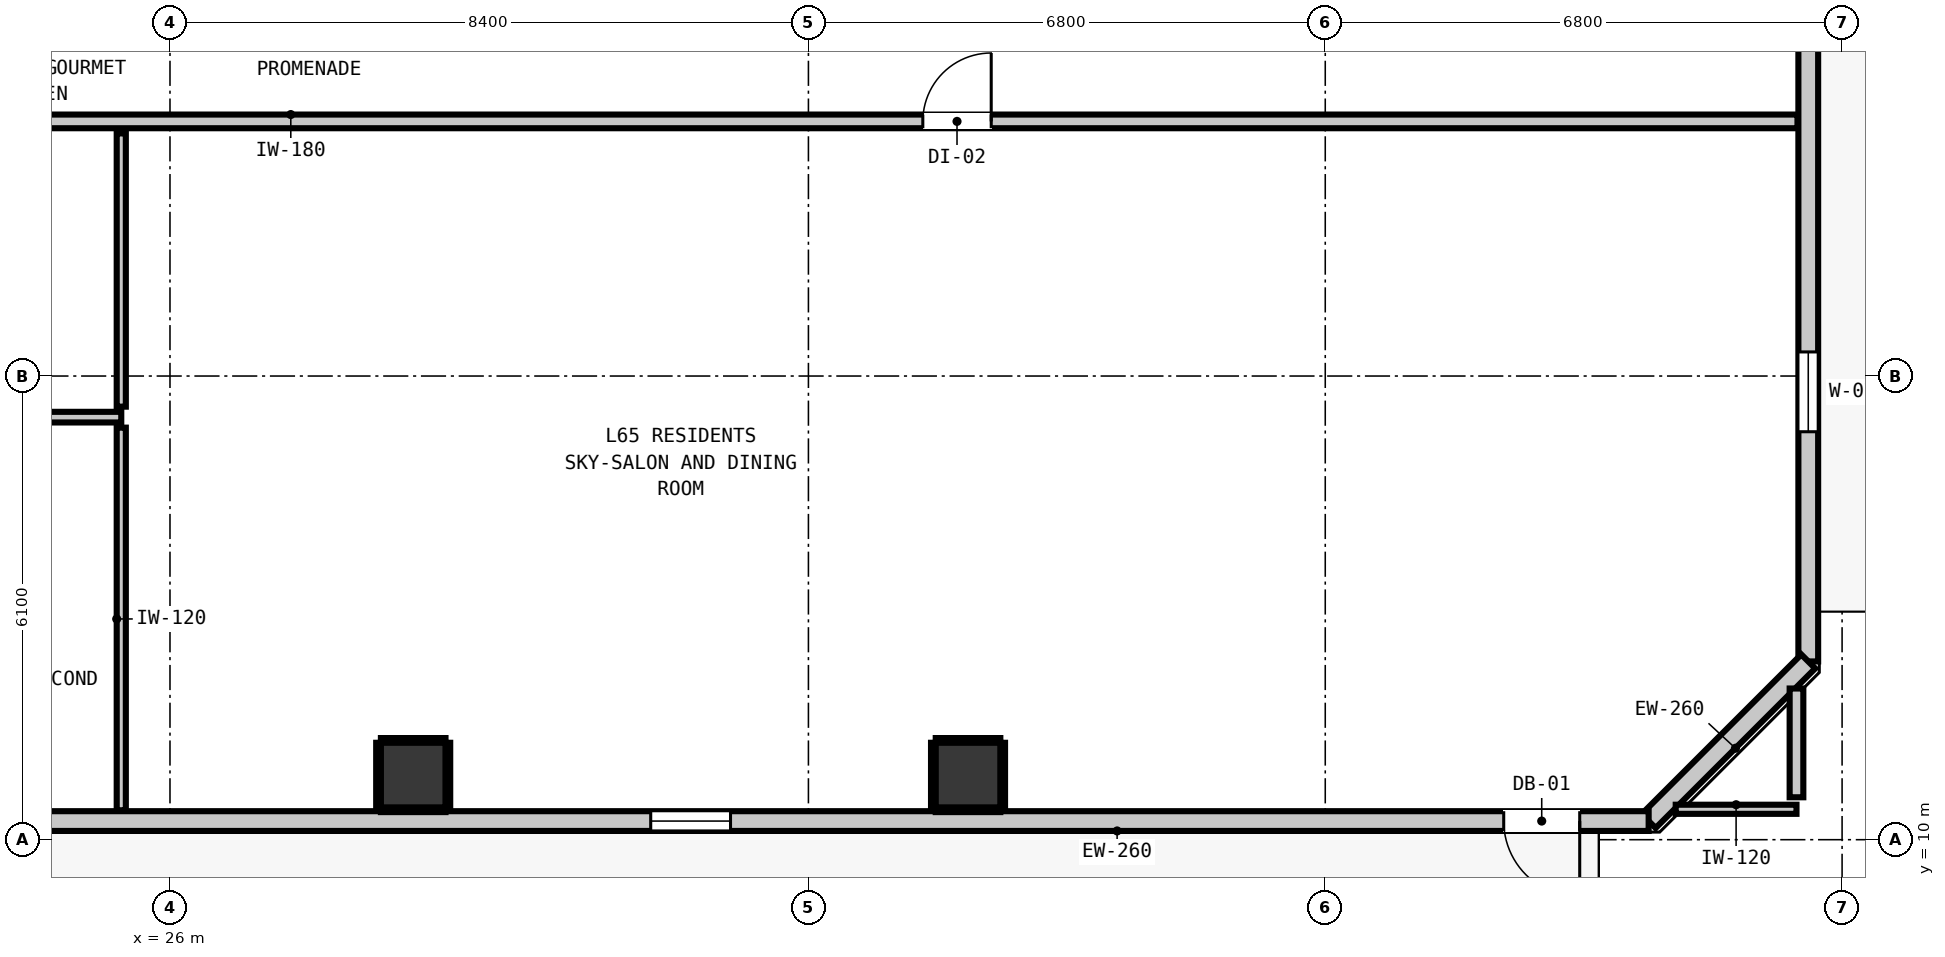
"""IFC4 building model, lengths in metres.
Left out: names, types, materials, properties, quantities, classifications, styles, units other than length and angle.
Written with IfcOpenShell. Run it as: python <this file> out.ifc"""

import sys

from ifc_helpers import new_model, si_unit, direction, frame, frame_2d, origin, origin_2d, place, context, subcontext, project, spatial, rectangle, extrude, element, fill, save


model = new_model("IFC4")
c1 = context("Model", 3, precision=1e-05, world=origin(), true_north=direction((0.0, 1.0)))
c2 = subcontext(c1, "Body", "Model", "MODEL_VIEW")
j1 = project(units=[si_unit("LENGTHUNIT", "METRE"), si_unit("PLANEANGLEUNIT", "RADIAN")], contexts=[c1])
p1 = place(None, origin())
s1 = spatial("IfcSite", under=j1, at=p1, CompositionType="ELEMENT")
p2 = place(p1, origin())
s2 = spatial("IfcBuilding", under=s1, at=p2, CompositionType="ELEMENT")
p3 = place(p2, frame((0.0, 0.0, 223.36)))
s3 = spatial("IfcBuildingStorey", under=s2, at=p3, CompositionType="ELEMENT", Elevation=223.36)
for number, where, z_axis, x_axis in (
    (1, (29.2, 10.85, 0.0), (0.0, 0.0, 1.0), (1.0, 0.0, 0.0)),
    (2, (36.5, 10.85, 0.0), (0.0, 0.0, 1.0), (1.0, 0.0, 0.0)),
):
    element("IfcColumn", number, at=place(p3, frame(where, z_axis=z_axis, x_axis=x_axis)), inside=s3, PredefinedType="COLUMN", context=c2, shape_type="SweptSolid", body=[
        extrude(rectangle(XDim=0.85, YDim=0.85, at=origin_2d()), origin(), (0.0, 0.0, 1.0), 3.32),
    ])
p4 = place(p3, frame((47.555, 42.655, 0.0), z_axis=(0.0, 0.0, 1.0), x_axis=(0.0, -1.0, 0.0)))
e3 = element("IfcWall", 3, at=p4, inside=s3, PredefinedType="STANDARD", context=c2, shape_type="SweptSolid", body=[
    extrude(rectangle(XDim=30.31, YDim=0.26, at=frame_2d((15.155, 0.0))), origin(), (0.0, 0.0, 1.0), 2.92),
])
p5 = place(p4, frame((4.082, 0.0, 0.0)))
e4 = element("IfcOpeningElement", 4, at=p5, cuts=e3, PredefinedType="OPENING", context=c2, shape_type="SweptSolid", body=[
    extrude(rectangle(XDim=1.0, YDim=2.15, at=frame_2d((0.5, 1.075))), frame((0.0, 0.14, 0.0), z_axis=(0.0, -1.0, 0.0), x_axis=(1.0, 0.0, 0.0)), (0.0, 0.0, 1.0), 0.28),
])
p6 = place(p4, frame((26.238, 0.0, 0.85)))
e5 = element("IfcOpeningElement", 5, at=p6, cuts=e3, PredefinedType="OPENING", context=c2, shape_type="SweptSolid", body=[
    extrude(rectangle(XDim=1.05, YDim=1.65, at=frame_2d((0.525, 0.825))), frame((0.0, 0.14, 0.0), z_axis=(0.0, -1.0, 0.0), x_axis=(1.0, 0.0, 0.0)), (0.0, 0.0, 1.0), 0.28),
])
p7 = place(p3, frame((47.555, 12.345, 0.0), z_axis=(0.0, 0.0, 1.0), x_axis=(-0.707106781187, -0.707106781187, 0.0)))
e6 = element("IfcWall", 6, at=p7, inside=s3, PredefinedType="STANDARD", context=c2, shape_type="SweptSolid", body=[
    extrude(rectangle(XDim=2.97, YDim=0.26, at=frame_2d((1.485, 0.0))), origin(), (0.0, 0.0, 1.0), 2.92),
])
p8 = place(p3, frame((45.455, 10.245, 0.0), z_axis=(0.0, 0.0, 1.0), x_axis=(-1.0, 0.0, 0.0)))
e7 = element("IfcWall", 7, at=p8, inside=s3, PredefinedType="STANDARD", context=c2, shape_type="SweptSolid", body=[
    extrude(rectangle(XDim=32.71, YDim=0.26, at=frame_2d((16.355, 0.0))), origin(), (0.0, 0.0, 1.0), 2.92),
])
p9 = place(p8, frame((0.907, 0.0, 0.0)))
e8 = element("IfcOpeningElement", 8, at=p9, cuts=e7, PredefinedType="OPENING", context=c2, shape_type="SweptSolid", body=[
    extrude(rectangle(XDim=1.0, YDim=2.15, at=frame_2d((0.5, 1.075))), frame((0.0, 0.14, 0.0), z_axis=(0.0, -1.0, 0.0), x_axis=(1.0, 0.0, 0.0)), (0.0, 0.0, 1.0), 0.28),
])
p10 = place(p8, frame((27.108, 0.0, 0.85)))
e9 = element("IfcOpeningElement", 9, at=p10, cuts=e7, PredefinedType="OPENING", context=c2, shape_type="SweptSolid", body=[
    extrude(rectangle(XDim=1.05, YDim=1.65, at=frame_2d((0.525, 0.825))), frame((0.0, 0.14, 0.0), z_axis=(0.0, -1.0, 0.0), x_axis=(1.0, 0.0, 0.0)), (0.0, 0.0, 1.0), 0.28),
])
p11 = place(p8, frame((30.558, 0.0, 0.85)))
e10 = element("IfcOpeningElement", 10, at=p11, cuts=e7, PredefinedType="OPENING", context=c2, shape_type="SweptSolid", body=[
    extrude(rectangle(XDim=0.9, YDim=1.5, at=frame_2d((0.45, 0.75))), frame((0.0, 0.14, 0.0), z_axis=(0.0, -1.0, 0.0), x_axis=(1.0, 0.0, 0.0)), (0.0, 0.0, 1.0), 0.28),
])
p12 = place(p8, frame((21.06, 0.0, 0.85)))
e11 = element("IfcOpeningElement", 11, at=p12, cuts=e7, PredefinedType="OPENING", context=c2, shape_type="SweptSolid", body=[
    extrude(rectangle(XDim=1.05, YDim=1.65, at=frame_2d((0.525, 0.825))), frame((0.0, 0.14, 0.0), z_axis=(0.0, -1.0, 0.0), x_axis=(1.0, 0.0, 0.0)), (0.0, 0.0, 1.0), 0.28),
])
p13 = place(p8, frame((12.08, 0.0, 0.85)))
e12 = element("IfcOpeningElement", 12, at=p13, cuts=e7, PredefinedType="OPENING", context=c2, shape_type="SweptSolid", body=[
    extrude(rectangle(XDim=1.05, YDim=1.65, at=frame_2d((0.525, 0.825))), frame((0.0, 0.14, 0.0), z_axis=(0.0, -1.0, 0.0), x_axis=(1.0, 0.0, 0.0)), (0.0, 0.0, 1.0), 0.28),
])
p14 = place(p3, frame((10.787, 19.45, 0.0), z_axis=(0.0, 0.0, 1.0), x_axis=(1.0, 0.0, 0.0)))
e13 = element("IfcWall", 13, at=p14, inside=s3, PredefinedType="PARTITIONING", context=c2, shape_type="SweptSolid", body=[
    extrude(rectangle(XDim=36.626, YDim=0.18, at=frame_2d((18.313, 0.0))), origin(), (0.0, 0.0, 1.0), 2.92),
])
p15 = place(p14, frame((7.487, 0.0, 0.0)))
e14 = element("IfcOpeningElement", 14, at=p15, cuts=e13, PredefinedType="OPENING", context=c2, shape_type="SweptSolid", body=[
    extrude(rectangle(XDim=1.0, YDim=2.15, at=frame_2d((0.5, 1.075))), frame((0.0, 0.1, 0.0), z_axis=(0.0, -1.0, 0.0), x_axis=(1.0, 0.0, 0.0)), (0.0, 0.0, 1.0), 0.2),
])
p16 = place(p14, frame((25.118, 0.0, 0.0)))
e15 = element("IfcOpeningElement", 15, at=p16, cuts=e13, PredefinedType="OPENING", context=c2, shape_type="SweptSolid", body=[
    extrude(rectangle(XDim=0.9, YDim=2.1, at=frame_2d((0.45, 1.05))), frame((0.0, 0.1, 0.0), z_axis=(0.0, -1.0, 0.0), x_axis=(1.0, 0.0, 0.0)), (0.0, 0.0, 1.0), 0.2),
])
p17 = place(p3, frame((22.38, 15.559, 0.0), z_axis=(0.0, 0.0, 1.0), x_axis=(1.0, 0.0, 0.0)))
e16 = element("IfcWall", 16, at=p17, inside=s3, PredefinedType="PARTITIONING", context=c2, shape_type="SweptSolid", body=[
    extrude(rectangle(XDim=2.979, YDim=0.14, at=frame_2d((1.49, 0.0))), origin(), (0.0, 0.0, 1.0), 2.92),
])
p18 = place(p3, frame((45.811, 10.4, 0.0), z_axis=(0.0, 0.0, 1.0), x_axis=(1.0, 0.0, 0.0)))
e17 = element("IfcWall", 17, at=p18, inside=s3, PredefinedType="PARTITIONING", context=c2, shape_type="SweptSolid", body=[
    extrude(rectangle(XDim=1.589, YDim=0.12, at=frame_2d((0.794, 0.0))), origin(), (0.0, 0.0, 1.0), 2.92),
])
p19 = place(p3, frame((47.4, 10.558, 0.0), z_axis=(0.0, 0.0, 1.0), x_axis=(0.0, 1.0, 0.0)))
e18 = element("IfcWall", 18, at=p19, inside=s3, PredefinedType="PARTITIONING", context=c2, shape_type="SweptSolid", body=[
    extrude(rectangle(XDim=1.431, YDim=0.18, at=frame_2d((0.715, 0.0))), origin(), (0.0, 0.0, 1.0), 2.92),
])
p20 = place(p3, frame((25.359, 10.387, 0.0), z_axis=(0.0, 0.0, 1.0), x_axis=(0.0, 1.0, 0.0)))
e19 = element("IfcWall", 19, at=p20, inside=s3, PredefinedType="PARTITIONING", context=c2, shape_type="SweptSolid", body=[
    extrude(rectangle(XDim=5.034, YDim=0.12, at=frame_2d((2.517, 0.0))), origin(), (0.0, 0.0, 1.0), 2.92),
])
p21 = place(p3, frame((25.359, 15.697, 0.0), z_axis=(0.0, 0.0, 1.0), x_axis=(0.0, 1.0, 0.0)))
e20 = element("IfcWall", 20, at=p21, inside=s3, PredefinedType="PARTITIONING", context=c2, shape_type="SweptSolid", body=[
    extrude(rectangle(XDim=3.595, YDim=0.12, at=frame_2d((1.797, 0.0))), origin(), (0.0, 0.0, 1.0), 2.92),
])
for number, where, z_axis, x_axis in (
    (21, (28.775, 10.393, 0.0), (0.0, 0.0, 1.0), (1.0, 0.0, 0.0)),
    (22, (28.775, 11.307, 0.0), (0.0, 0.0, 1.0), (1.0, 0.0, 0.0)),
):
    element("IfcWall", number, at=place(p3, frame(where, z_axis=z_axis, x_axis=x_axis)), inside=s3, PredefinedType="PARTITIONING", context=c2, shape_type="SweptSolid", body=[
        extrude(rectangle(XDim=0.85, YDim=0.06, at=frame_2d((0.425, 0.0))), origin(), (0.0, 0.0, 1.0), 1.45),
    ])
for number, where, z_axis, x_axis in (
    (23, (28.743, 10.425, 0.0), (0.0, 0.0, 1.0), (0.0, 1.0, 0.0)),
    (24, (29.657, 10.425, 0.0), (0.0, 0.0, 1.0), (0.0, 1.0, 0.0)),
):
    element("IfcWall", number, at=place(p3, frame(where, z_axis=z_axis, x_axis=x_axis)), inside=s3, PredefinedType="PARTITIONING", context=c2, shape_type="SweptSolid", body=[
        extrude(rectangle(XDim=0.85, YDim=0.06, at=frame_2d((0.425, 0.0))), origin(), (0.0, 0.0, 1.0), 1.45),
    ])
for number, where, z_axis, x_axis in (
    (25, (36.075, 10.393, 0.0), (0.0, 0.0, 1.0), (1.0, 0.0, 0.0)),
    (26, (36.075, 11.307, 0.0), (0.0, 0.0, 1.0), (1.0, 0.0, 0.0)),
):
    element("IfcWall", number, at=place(p3, frame(where, z_axis=z_axis, x_axis=x_axis)), inside=s3, PredefinedType="PARTITIONING", context=c2, shape_type="SweptSolid", body=[
        extrude(rectangle(XDim=0.85, YDim=0.06, at=frame_2d((0.425, 0.0))), origin(), (0.0, 0.0, 1.0), 1.45),
    ])
for number, where, z_axis, x_axis in (
    (27, (36.043, 10.425, 0.0), (0.0, 0.0, 1.0), (0.0, 1.0, 0.0)),
    (28, (36.957, 10.425, 0.0), (0.0, 0.0, 1.0), (0.0, 1.0, 0.0)),
):
    element("IfcWall", number, at=place(p3, frame(where, z_axis=z_axis, x_axis=x_axis)), inside=s3, PredefinedType="PARTITIONING", context=c2, shape_type="SweptSolid", body=[
        extrude(rectangle(XDim=0.85, YDim=0.06, at=frame_2d((0.425, 0.0))), origin(), (0.0, 0.0, 1.0), 1.45),
    ])
p22 = place(p9, origin())
e29 = element("IfcDoor", 29, at=p22, inside=s3, OperationType="SINGLE_SWING_LEFT", PredefinedType="DOOR", context=c2, shape_type="SweptSolid", body=[
    extrude(rectangle(XDim=1.0, YDim=2.15, at=frame_2d((0.5, 1.075))), frame((0.0, 0.025, 0.0), z_axis=(0.0, -1.0, 0.0), x_axis=(1.0, 0.0, 0.0)), (0.0, 0.0, 1.0), 0.05),
])
fill(e8, e29)
p23 = place(p6, origin())
e30 = element("IfcWindow", 30, at=p23, inside=s3, PartitioningType="SINGLE_PANEL", PredefinedType="WINDOW", context=c2, shape_type="SweptSolid", body=[
    extrude(rectangle(XDim=1.05, YDim=1.65, at=frame_2d((0.525, 0.825))), frame((0.0, 0.03, 0.0), z_axis=(0.0, -1.0, 0.0), x_axis=(1.0, 0.0, 0.0)), (0.0, 0.0, 1.0), 0.06),
])
fill(e5, e30)
p24 = place(p13, origin())
e31 = element("IfcWindow", 31, at=p24, inside=s3, PartitioningType="SINGLE_PANEL", PredefinedType="WINDOW", context=c2, shape_type="SweptSolid", body=[
    extrude(rectangle(XDim=1.05, YDim=1.65, at=frame_2d((0.525, 0.825))), frame((0.0, 0.03, 0.0), z_axis=(0.0, -1.0, 0.0), x_axis=(1.0, 0.0, 0.0)), (0.0, 0.0, 1.0), 0.06),
])
fill(e12, e31)
p25 = place(p16, origin())
e32 = element("IfcDoor", 32, at=p25, inside=s3, OperationType="SINGLE_SWING_RIGHT", PredefinedType="DOOR", context=c2, shape_type="SweptSolid", body=[
    extrude(rectangle(XDim=0.9, YDim=2.1, at=frame_2d((0.45, 1.05))), frame((0.0, 0.025, 0.0), z_axis=(0.0, -1.0, 0.0), x_axis=(1.0, 0.0, 0.0)), (0.0, 0.0, 1.0), 0.05),
])
fill(e15, e32)
save(model, sys.argv[1])
